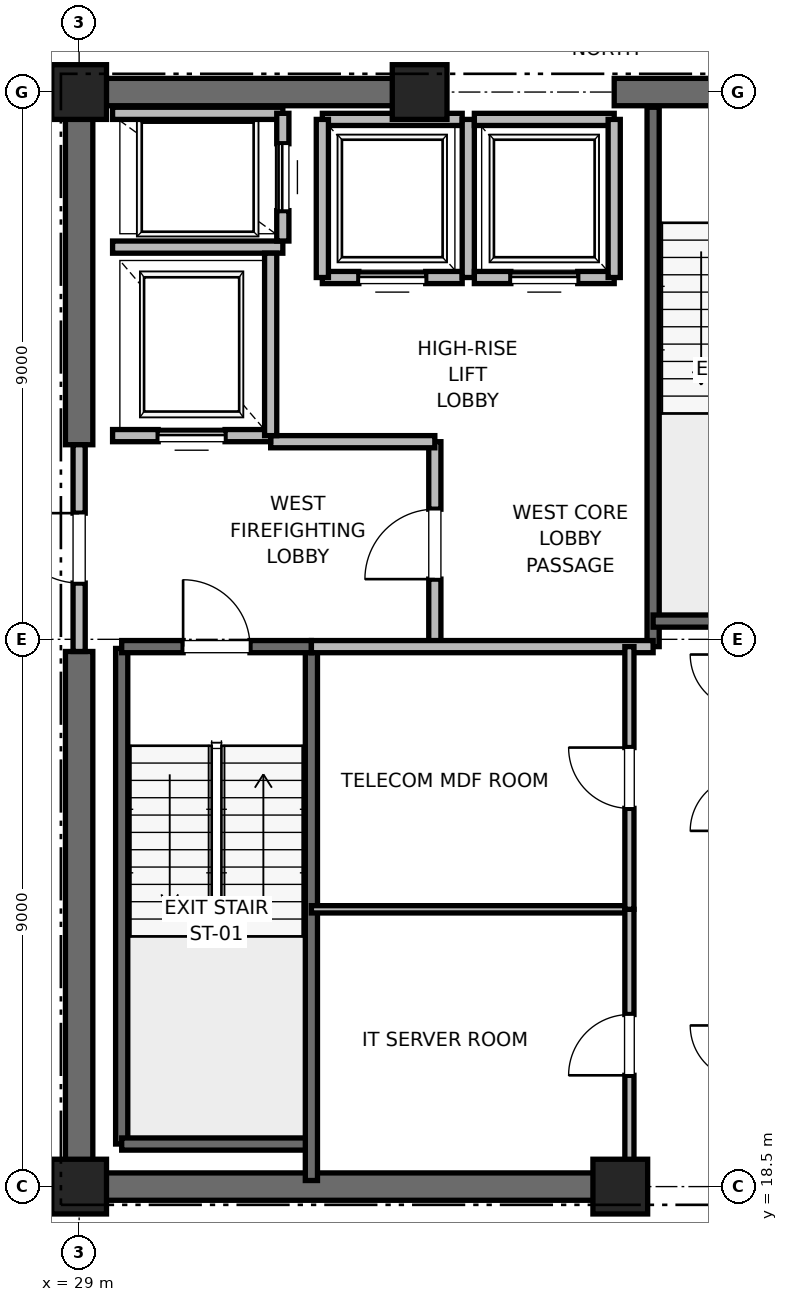
"""IFC4 building model, lengths in metres.
Left out: names, types, materials, properties, quantities, classifications, styles, units other than length and angle.
Written with IfcOpenShell. Run it as: python <this file> out.ifc"""

import sys

from ifc_helpers import new_model, si_unit, direction, frame, frame_2d, origin, origin_2d, place, context, subcontext, project, spatial, rectangle, extrude, element, fill, save


model = new_model("IFC4")
c1 = context("Model", 3, precision=1e-05, world=origin(), true_north=direction((0.0, 1.0)))
c2 = subcontext(c1, "Body", "Model", "MODEL_VIEW")
j1 = project(units=[si_unit("LENGTHUNIT", "METRE"), si_unit("PLANEANGLEUNIT", "RADIAN")], contexts=[c1])
p1 = place(None, origin())
s1 = spatial("IfcSite", under=j1, at=p1, CompositionType="ELEMENT")
p2 = place(p1, origin())
s2 = spatial("IfcBuilding", under=s1, at=p2, CompositionType="ELEMENT")
p3 = place(p2, frame((0.0, 0.0, 279.2)))
s3 = spatial("IfcBuildingStorey", under=s2, at=p3, CompositionType="ELEMENT", Elevation=279.2)
for number, where, z_axis, x_axis in (
    (1, (29.0, 18.5, 0.0), (0.0, 0.0, 1.0), (1.0, 0.0, 0.0)),
    (2, (29.0, 36.5, 0.0), (0.0, 0.0, 1.0), (1.0, 0.0, 0.0)),
    (3, (37.9, 18.5, 0.0), (0.0, 0.0, 1.0), (1.0, 0.0, 0.0)),
    (4, (34.6, 36.5, 0.0), (0.0, 0.0, 1.0), (1.0, 0.0, 0.0)),
):
    element("IfcColumn", number, at=place(p3, frame(where, z_axis=z_axis, x_axis=x_axis)), inside=s3, PredefinedType="PILASTER", context=c2, shape_type="SweptSolid", body=[
        extrude(rectangle(XDim=0.9, YDim=0.9, at=origin_2d()), origin(), (0.0, 0.0, 1.0), 4.0),
    ])
p4 = place(p3, frame((29.0, 18.5, 0.0), z_axis=(0.0, 0.0, 1.0), x_axis=(1.0, 0.0, 0.0)))
e5 = element("IfcWall", 5, at=p4, inside=s3, PredefinedType="SHEAR", context=c2, shape_type="SweptSolid", body=[
    extrude(rectangle(XDim=9.2, YDim=0.45, at=frame_2d((4.6, 0.0))), origin(), (0.0, 0.0, 1.0), 3.785),
])
p5 = place(p3, frame((29.0, 36.5, 0.0), z_axis=(0.0, 0.0, 1.0), x_axis=(1.0, 0.0, 0.0)))
e6 = element("IfcWall", 6, at=p5, inside=s3, PredefinedType="SHEAR", context=c2, shape_type="SweptSolid", body=[
    extrude(rectangle(XDim=5.8, YDim=0.45, at=frame_2d((2.9, 0.0))), origin(), (0.0, 0.0, 1.0), 3.785),
])
p6 = place(p3, frame((37.8, 36.5, 0.0), z_axis=(0.0, 0.0, 1.0), x_axis=(1.0, 0.0, 0.0)))
e7 = element("IfcWall", 7, at=p6, inside=s3, PredefinedType="SHEAR", context=c2, shape_type="SweptSolid", body=[
    extrude(rectangle(XDim=4.4, YDim=0.45, at=frame_2d((2.2, 0.0))), origin(), (0.0, 0.0, 1.0), 3.785),
])
p7 = place(p6, frame((1.65, 0.0, 0.0)))
e8 = element("IfcOpeningElement", 8, at=p7, cuts=e7, PredefinedType="OPENING", context=c2, shape_type="SweptSolid", body=[
    extrude(rectangle(XDim=1.1, YDim=2.15, at=frame_2d((0.55, 1.075))), frame((0.0, 0.225, 0.0), z_axis=(0.0, -1.0, 0.0), x_axis=(1.0, 0.0, 0.0)), (0.0, 0.0, 1.0), 0.45),
])
p8 = place(p3, frame((29.0, 18.5, 0.0), z_axis=(0.0, 0.0, 1.0), x_axis=(0.0, 1.0, 0.0)))
e9 = element("IfcWall", 9, at=p8, inside=s3, PredefinedType="SHEAR", context=c2, shape_type="SweptSolid", body=[
    extrude(rectangle(XDim=8.8, YDim=0.45, at=frame_2d((4.4, 0.0))), origin(), (0.0, 0.0, 1.0), 3.785),
])
p9 = place(p3, frame((29.0, 30.7, 0.0), z_axis=(0.0, 0.0, 1.0), x_axis=(0.0, 1.0, 0.0)))
e10 = element("IfcWall", 10, at=p9, inside=s3, PredefinedType="SHEAR", context=c2, shape_type="SweptSolid", body=[
    extrude(rectangle(XDim=5.8, YDim=0.45, at=frame_2d((2.9, 0.0))), origin(), (0.0, 0.0, 1.0), 3.785),
])
p10 = place(p3, frame((29.7, 19.2, 0.0), z_axis=(0.0, 0.0, 1.0), x_axis=(0.0, 1.0, 0.0)))
e11 = element("IfcWall", 11, at=p10, inside=s3, PredefinedType="SOLIDWALL", context=c2, shape_type="SweptSolid", body=[
    extrude(rectangle(XDim=8.15, YDim=0.2, at=frame_2d((4.075, 0.0))), origin(), (0.0, 0.0, 1.0), 3.785),
])
p11 = place(p3, frame((29.7, 19.2, 0.0), z_axis=(0.0, 0.0, 1.0), x_axis=(1.0, 0.0, 0.0)))
e12 = element("IfcWall", 12, at=p11, inside=s3, PredefinedType="SOLIDWALL", context=c2, shape_type="SweptSolid", body=[
    extrude(rectangle(XDim=3.12, YDim=0.2, at=frame_2d((1.56, 0.0))), origin(), (0.0, 0.0, 1.0), 3.785),
])
p12 = place(p3, frame((32.82, 18.6, 0.0), z_axis=(0.0, 0.0, 1.0), x_axis=(0.0, 1.0, 0.0)))
e13 = element("IfcWall", 13, at=p12, inside=s3, PredefinedType="SOLIDWALL", context=c2, shape_type="SweptSolid", body=[
    extrude(rectangle(XDim=8.78, YDim=0.2, at=frame_2d((4.39, 0.0))), origin(), (0.0, 0.0, 1.0), 3.785),
])
p13 = place(p3, frame((29.7, 27.38, 0.0), z_axis=(0.0, 0.0, 1.0), x_axis=(1.0, 0.0, 0.0)))
e14 = element("IfcWall", 14, at=p13, inside=s3, PredefinedType="SOLIDWALL", context=c2, shape_type="SweptSolid", body=[
    extrude(rectangle(XDim=3.12, YDim=0.2, at=frame_2d((1.56, 0.0))), origin(), (0.0, 0.0, 1.0), 3.785),
])
p14 = place(p13, frame((1.01, 0.0, 0.0)))
e15 = element("IfcOpeningElement", 15, at=p14, cuts=e14, PredefinedType="OPENING", context=c2, shape_type="SweptSolid", body=[
    extrude(rectangle(XDim=1.1, YDim=2.15, at=frame_2d((0.55, 1.075))), frame((0.0, 0.1, 0.0), z_axis=(0.0, -1.0, 0.0), x_axis=(1.0, 0.0, 0.0)), (0.0, 0.0, 1.0), 0.2),
])
p15 = place(p3, frame((38.44, 27.38, 0.0), z_axis=(0.0, 0.0, 1.0), x_axis=(0.0, 1.0, 0.0)))
e16 = element("IfcWall", 16, at=p15, inside=s3, PredefinedType="SOLIDWALL", context=c2, shape_type="SweptSolid", body=[
    extrude(rectangle(XDim=8.87, YDim=0.2, at=frame_2d((4.435, 0.0))), origin(), (0.0, 0.0, 1.0), 3.785),
])
p16 = place(p3, frame((38.44, 27.8, 0.0), z_axis=(0.0, 0.0, 1.0), x_axis=(1.0, 0.0, 0.0)))
e17 = element("IfcWall", 17, at=p16, inside=s3, PredefinedType="SOLIDWALL", context=c2, shape_type="SweptSolid", body=[
    extrude(rectangle(XDim=3.32, YDim=0.2, at=frame_2d((1.66, 0.0))), origin(), (0.0, 0.0, 1.0), 3.785),
])
p17 = place(p3, frame((34.85, 27.38, 0.0), z_axis=(0.0, 0.0, 1.0), x_axis=(0.0, 1.0, 0.0)))
e18 = element("IfcWall", 18, at=p17, inside=s3, PredefinedType="PARTITIONING", context=c2, shape_type="SweptSolid", body=[
    extrude(rectangle(XDim=3.37, YDim=0.2, at=frame_2d((1.685, 0.0))), origin(), (0.0, 0.0, 1.0), 3.785),
])
p18 = place(p17, frame((1.11, 0.0, 0.0)))
e19 = element("IfcOpeningElement", 19, at=p18, cuts=e18, PredefinedType="OPENING", context=c2, shape_type="SweptSolid", body=[
    extrude(rectangle(XDim=1.15, YDim=2.2, at=frame_2d((0.575, 1.1))), frame((0.0, 0.1, 0.0), z_axis=(0.0, -1.0, 0.0), x_axis=(1.0, 0.0, 0.0)), (0.0, 0.0, 1.0), 0.2),
])
p19 = place(p3, frame((29.0, 27.3, 0.0), z_axis=(0.0, 0.0, 1.0), x_axis=(0.0, 1.0, 0.0)))
e20 = element("IfcWall", 20, at=p19, inside=s3, PredefinedType="PARTITIONING", context=c2, shape_type="SweptSolid", body=[
    extrude(rectangle(XDim=3.4, YDim=0.2, at=frame_2d((1.7, 0.0))), origin(), (0.0, 0.0, 1.0), 2.865),
])
p20 = place(p19, frame((1.125, 0.0, 0.0)))
e21 = element("IfcOpeningElement", 21, at=p20, cuts=e20, PredefinedType="OPENING", context=c2, shape_type="SweptSolid", body=[
    extrude(rectangle(XDim=1.15, YDim=2.2, at=frame_2d((0.575, 1.1))), frame((0.0, 0.1, 0.0), z_axis=(0.0, -1.0, 0.0), x_axis=(1.0, 0.0, 0.0)), (0.0, 0.0, 1.0), 0.2),
])
p21 = place(p3, frame((32.82, 27.38, 0.0), z_axis=(0.0, 0.0, 1.0), x_axis=(1.0, 0.0, 0.0)))
e22 = element("IfcWall", 22, at=p21, inside=s3, PredefinedType="PARTITIONING", context=c2, shape_type="SweptSolid", body=[
    extrude(rectangle(XDim=5.62, YDim=0.2, at=frame_2d((2.81, 0.0))), origin(), (0.0, 0.0, 1.0), 3.785),
])
p22 = place(p3, frame((32.15, 30.75, 0.0), z_axis=(0.0, 0.0, 1.0), x_axis=(1.0, 0.0, 0.0)))
e23 = element("IfcWall", 23, at=p22, inside=s3, PredefinedType="PARTITIONING", context=c2, shape_type="SweptSolid", body=[
    extrude(rectangle(XDim=2.7, YDim=0.2, at=frame_2d((1.35, 0.0))), origin(), (0.0, 0.0, 1.0), 3.785),
])
p23 = place(p3, frame((29.55, 30.85, 0.0), z_axis=(0.0, 0.0, 1.0), x_axis=(1.0, 0.0, 0.0)))
e24 = element("IfcWall", 24, at=p23, inside=s3, PredefinedType="SOLIDWALL", context=c2, shape_type="SweptSolid", body=[
    extrude(rectangle(XDim=2.6, YDim=0.2, at=frame_2d((1.3, 0.0))), origin(), (0.0, 0.0, 1.0), 2.865),
])
p24 = place(p23, frame((0.75, 0.0, 0.0)))
e25 = element("IfcOpeningElement", 25, at=p24, cuts=e24, PredefinedType="OPENING", context=c2, shape_type="SweptSolid", body=[
    extrude(rectangle(XDim=1.1, YDim=2.2, at=frame_2d((0.55, 1.1))), frame((0.0, 0.1, 0.0), z_axis=(0.0, -1.0, 0.0), x_axis=(1.0, 0.0, 0.0)), (0.0, 0.0, 1.0), 0.2),
])
p25 = place(p3, frame((29.55, 33.95, 0.0), z_axis=(0.0, 0.0, 1.0), x_axis=(1.0, 0.0, 0.0)))
e26 = element("IfcWall", 26, at=p25, inside=s3, PredefinedType="SOLIDWALL", context=c2, shape_type="SweptSolid", body=[
    extrude(rectangle(XDim=2.8, YDim=0.2, at=frame_2d((1.4, 0.0))), origin(), (0.0, 0.0, 1.0), 3.785),
])
p26 = place(p3, frame((32.15, 30.85, 0.0), z_axis=(0.0, 0.0, 1.0), x_axis=(0.0, 1.0, 0.0)))
e27 = element("IfcWall", 27, at=p26, inside=s3, PredefinedType="SOLIDWALL", context=c2, shape_type="SweptSolid", body=[
    extrude(rectangle(XDim=3.0, YDim=0.2, at=frame_2d((1.5, 0.0))), origin(), (0.0, 0.0, 1.0), 3.785),
])
p27 = place(p3, frame((32.35, 36.15, 0.0), z_axis=(0.0, 0.0, 1.0), x_axis=(-1.0, 0.0, 0.0)))
e28 = element("IfcWall", 28, at=p27, inside=s3, PredefinedType="SOLIDWALL", context=c2, shape_type="SweptSolid", body=[
    extrude(rectangle(XDim=2.8, YDim=0.2, at=frame_2d((1.4, 0.0))), origin(), (0.0, 0.0, 1.0), 3.148),
])
p28 = place(p3, frame((32.35, 34.05, 0.0), z_axis=(0.0, 0.0, 1.0), x_axis=(0.0, 1.0, 0.0)))
e29 = element("IfcWall", 29, at=p28, inside=s3, PredefinedType="SOLIDWALL", context=c2, shape_type="SweptSolid", body=[
    extrude(rectangle(XDim=2.1, YDim=0.2, at=frame_2d((1.05, 0.0))), origin(), (0.0, 0.0, 1.0), 3.785),
])
p29 = place(p28, frame((0.5, 0.0, 0.0)))
e30 = element("IfcOpeningElement", 30, at=p29, cuts=e29, PredefinedType="OPENING", context=c2, shape_type="SweptSolid", body=[
    extrude(rectangle(XDim=1.1, YDim=2.2, at=frame_2d((0.55, 1.1))), frame((0.0, 0.1, 0.0), z_axis=(0.0, -1.0, 0.0), x_axis=(1.0, 0.0, 0.0)), (0.0, 0.0, 1.0), 0.2),
])
p30 = place(p3, frame((33.0, 33.45, 0.0), z_axis=(0.0, 0.0, 1.0), x_axis=(1.0, 0.0, 0.0)))
e31 = element("IfcWall", 31, at=p30, inside=s3, PredefinedType="SOLIDWALL", context=c2, shape_type="SweptSolid", body=[
    extrude(rectangle(XDim=2.3, YDim=0.2, at=frame_2d((1.15, 0.0))), origin(), (0.0, 0.0, 1.0), 3.785),
])
p31 = place(p30, frame((0.6, 0.0, 0.0)))
e32 = element("IfcOpeningElement", 32, at=p31, cuts=e31, PredefinedType="OPENING", context=c2, shape_type="SweptSolid", body=[
    extrude(rectangle(XDim=1.1, YDim=2.2, at=frame_2d((0.55, 1.1))), frame((0.0, 0.1, 0.0), z_axis=(0.0, -1.0, 0.0), x_axis=(1.0, 0.0, 0.0)), (0.0, 0.0, 1.0), 0.2),
])
p32 = place(p3, frame((35.3, 36.05, 0.0), z_axis=(0.0, 0.0, 1.0), x_axis=(-1.0, 0.0, 0.0)))
e33 = element("IfcWall", 33, at=p32, inside=s3, PredefinedType="SOLIDWALL", context=c2, shape_type="SweptSolid", body=[
    extrude(rectangle(XDim=2.3, YDim=0.2, at=frame_2d((1.15, 0.0))), origin(), (0.0, 0.0, 1.0), 2.865),
])
p33 = place(p3, frame((33.0, 36.05, 0.0), z_axis=(0.0, 0.0, 1.0), x_axis=(0.0, -1.0, 0.0)))
e34 = element("IfcWall", 34, at=p33, inside=s3, PredefinedType="SOLIDWALL", context=c2, shape_type="SweptSolid", body=[
    extrude(rectangle(XDim=2.6, YDim=0.2, at=frame_2d((1.3, 0.0))), origin(), (0.0, 0.0, 1.0), 3.785),
])
p34 = place(p3, frame((35.4, 33.45, 0.0), z_axis=(0.0, 0.0, 1.0), x_axis=(0.0, 1.0, 0.0)))
e35 = element("IfcWall", 35, at=p34, inside=s3, PredefinedType="SOLIDWALL", context=c2, shape_type="SweptSolid", body=[
    extrude(rectangle(XDim=2.6, YDim=0.2, at=frame_2d((1.3, 0.0))), origin(), (0.0, 0.0, 1.0), 2.865),
])
p35 = place(p3, frame((35.5, 33.45, 0.0), z_axis=(0.0, 0.0, 1.0), x_axis=(1.0, 0.0, 0.0)))
e36 = element("IfcWall", 36, at=p35, inside=s3, PredefinedType="SOLIDWALL", context=c2, shape_type="SweptSolid", body=[
    extrude(rectangle(XDim=2.3, YDim=0.2, at=frame_2d((1.15, 0.0))), origin(), (0.0, 0.0, 1.0), 3.785),
])
p36 = place(p35, frame((0.6, 0.0, 0.0)))
e37 = element("IfcOpeningElement", 37, at=p36, cuts=e36, PredefinedType="OPENING", context=c2, shape_type="SweptSolid", body=[
    extrude(rectangle(XDim=1.1, YDim=2.2, at=frame_2d((0.55, 1.1))), frame((0.0, 0.1, 0.0), z_axis=(0.0, -1.0, 0.0), x_axis=(1.0, 0.0, 0.0)), (0.0, 0.0, 1.0), 0.2),
])
p37 = place(p3, frame((37.8, 36.05, 0.0), z_axis=(0.0, 0.0, 1.0), x_axis=(-1.0, 0.0, 0.0)))
e38 = element("IfcWall", 38, at=p37, inside=s3, PredefinedType="SOLIDWALL", context=c2, shape_type="SweptSolid", body=[
    extrude(rectangle(XDim=2.3, YDim=0.2, at=frame_2d((1.15, 0.0))), origin(), (0.0, 0.0, 1.0), 2.865),
])
p38 = place(p3, frame((37.8, 33.45, 0.0), z_axis=(0.0, 0.0, 1.0), x_axis=(0.0, 1.0, 0.0)))
e39 = element("IfcWall", 39, at=p38, inside=s3, PredefinedType="SOLIDWALL", context=c2, shape_type="SweptSolid", body=[
    extrude(rectangle(XDim=2.6, YDim=0.2, at=frame_2d((1.3, 0.0))), origin(), (0.0, 0.0, 1.0), 2.865),
])
p39 = place(p3, frame((32.82, 23.06, 0.0), z_axis=(0.0, 0.0, 1.0), x_axis=(1.0, 0.0, 0.0)))
e40 = element("IfcWall", 40, at=p39, inside=s3, PredefinedType="PARTITIONING", context=c2, shape_type="SweptSolid", body=[
    extrude(rectangle(XDim=5.23, YDim=0.12, at=frame_2d((2.615, 0.0))), origin(), (0.0, 0.0, 1.0), 2.85),
])
p40 = place(p3, frame((38.05, 18.6, 0.0), z_axis=(0.0, 0.0, 1.0), x_axis=(0.0, 1.0, 0.0)))
e41 = element("IfcWall", 41, at=p40, inside=s3, PredefinedType="PARTITIONING", context=c2, shape_type="SweptSolid", body=[
    extrude(rectangle(XDim=4.46, YDim=0.15, at=frame_2d((2.23, 0.0))), origin(), (0.0, 0.0, 1.0), 2.85),
])
p41 = place(p40, frame((1.73, 0.0, 0.0)))
e42 = element("IfcOpeningElement", 42, at=p41, cuts=e41, PredefinedType="OPENING", context=c2, shape_type="SweptSolid", body=[
    extrude(rectangle(XDim=1.0, YDim=2.15, at=frame_2d((0.5, 1.075))), frame((0.0, 0.075, 0.0), z_axis=(0.0, -1.0, 0.0), x_axis=(1.0, 0.0, 0.0)), (0.0, 0.0, 1.0), 0.15),
])
p42 = place(p3, frame((38.05, 23.06, 0.0), z_axis=(0.0, 0.0, 1.0), x_axis=(0.0, 1.0, 0.0)))
e43 = element("IfcWall", 43, at=p42, inside=s3, PredefinedType="PARTITIONING", context=c2, shape_type="SweptSolid", body=[
    extrude(rectangle(XDim=4.32, YDim=0.15, at=frame_2d((2.16, 0.0))), origin(), (0.0, 0.0, 1.0), 2.85),
])
p43 = place(p42, frame((1.66, 0.0, 0.0)))
e44 = element("IfcOpeningElement", 44, at=p43, cuts=e43, PredefinedType="OPENING", context=c2, shape_type="SweptSolid", body=[
    extrude(rectangle(XDim=1.0, YDim=2.15, at=frame_2d((0.5, 1.075))), frame((0.0, 0.075, 0.0), z_axis=(0.0, -1.0, 0.0), x_axis=(1.0, 0.0, 0.0)), (0.0, 0.0, 1.0), 0.15),
])
p44 = place(p14, origin())
e45 = element("IfcDoor", 45, at=p44, inside=s3, OperationType="SINGLE_SWING_LEFT", PredefinedType="DOOR", context=c2, shape_type="SweptSolid", body=[
    extrude(rectangle(XDim=1.1, YDim=2.15, at=frame_2d((0.55, 1.075))), frame((0.0, 0.025, 0.0), z_axis=(0.0, -1.0, 0.0), x_axis=(1.0, 0.0, 0.0)), (0.0, 0.0, 1.0), 0.05),
])
fill(e15, e45)
p45 = place(p18, origin())
e46 = element("IfcDoor", 46, at=p45, inside=s3, OperationType="SINGLE_SWING_LEFT", PredefinedType="DOOR", context=c2, shape_type="SweptSolid", body=[
    extrude(rectangle(XDim=1.15, YDim=2.2, at=frame_2d((0.575, 1.1))), frame((0.0, 0.025, 0.0), z_axis=(0.0, -1.0, 0.0), x_axis=(1.0, 0.0, 0.0)), (0.0, 0.0, 1.0), 0.05),
])
fill(e19, e46)
p46 = place(p20, origin())
e47 = element("IfcDoor", 47, at=p46, inside=s3, OperationType="SINGLE_SWING_RIGHT", PredefinedType="DOOR", context=c2, shape_type="SweptSolid", body=[
    extrude(rectangle(XDim=1.15, YDim=2.2, at=frame_2d((0.575, 1.1))), frame((0.0, 0.025, 0.0), z_axis=(0.0, -1.0, 0.0), x_axis=(1.0, 0.0, 0.0)), (0.0, 0.0, 1.0), 0.05),
])
fill(e21, e47)
p47 = place(p24, origin())
e48 = element("IfcDoor", 48, at=p47, inside=s3, OperationType="SLIDING_TO_RIGHT", PredefinedType="DOOR", context=c2, shape_type="SweptSolid", body=[
    extrude(rectangle(XDim=1.1, YDim=2.2, at=frame_2d((0.55, 1.1))), frame((0.0, 0.025, 0.0), z_axis=(0.0, -1.0, 0.0), x_axis=(1.0, 0.0, 0.0)), (0.0, 0.0, 1.0), 0.05),
])
fill(e25, e48)
p48 = place(p29, origin())
e49 = element("IfcDoor", 49, at=p48, inside=s3, OperationType="SLIDING_TO_RIGHT", PredefinedType="DOOR", context=c2, shape_type="SweptSolid", body=[
    extrude(rectangle(XDim=1.1, YDim=2.2, at=frame_2d((0.55, 1.1))), frame((0.0, 0.025, 0.0), z_axis=(0.0, -1.0, 0.0), x_axis=(1.0, 0.0, 0.0)), (0.0, 0.0, 1.0), 0.05),
])
fill(e30, e49)
p49 = place(p31, origin())
e50 = element("IfcDoor", 50, at=p49, inside=s3, OperationType="SLIDING_TO_RIGHT", PredefinedType="DOOR", context=c2, shape_type="SweptSolid", body=[
    extrude(rectangle(XDim=1.1, YDim=2.2, at=frame_2d((0.55, 1.1))), frame((0.0, 0.025, 0.0), z_axis=(0.0, -1.0, 0.0), x_axis=(1.0, 0.0, 0.0)), (0.0, 0.0, 1.0), 0.05),
])
fill(e32, e50)
p50 = place(p36, origin())
e51 = element("IfcDoor", 51, at=p50, inside=s3, OperationType="SLIDING_TO_RIGHT", PredefinedType="DOOR", context=c2, shape_type="SweptSolid", body=[
    extrude(rectangle(XDim=1.1, YDim=2.2, at=frame_2d((0.55, 1.1))), frame((0.0, 0.025, 0.0), z_axis=(0.0, -1.0, 0.0), x_axis=(1.0, 0.0, 0.0)), (0.0, 0.0, 1.0), 0.05),
])
fill(e37, e51)
p51 = place(p41, origin())
e52 = element("IfcDoor", 52, at=p51, inside=s3, OperationType="SINGLE_SWING_LEFT", PredefinedType="DOOR", context=c2, shape_type="SweptSolid", body=[
    extrude(rectangle(XDim=1.0, YDim=2.15, at=frame_2d((0.5, 1.075))), frame((0.0, 0.025, 0.0), z_axis=(0.0, -1.0, 0.0), x_axis=(1.0, 0.0, 0.0)), (0.0, 0.0, 1.0), 0.05),
])
fill(e42, e52)
p52 = place(p43, origin())
e53 = element("IfcDoor", 53, at=p52, inside=s3, OperationType="SINGLE_SWING_RIGHT", PredefinedType="DOOR", context=c2, shape_type="SweptSolid", body=[
    extrude(rectangle(XDim=1.0, YDim=2.15, at=frame_2d((0.5, 1.075))), frame((0.0, 0.025, 0.0), z_axis=(0.0, -1.0, 0.0), x_axis=(1.0, 0.0, 0.0)), (0.0, 0.0, 1.0), 0.05),
])
fill(e44, e53)
save(model, sys.argv[1])
